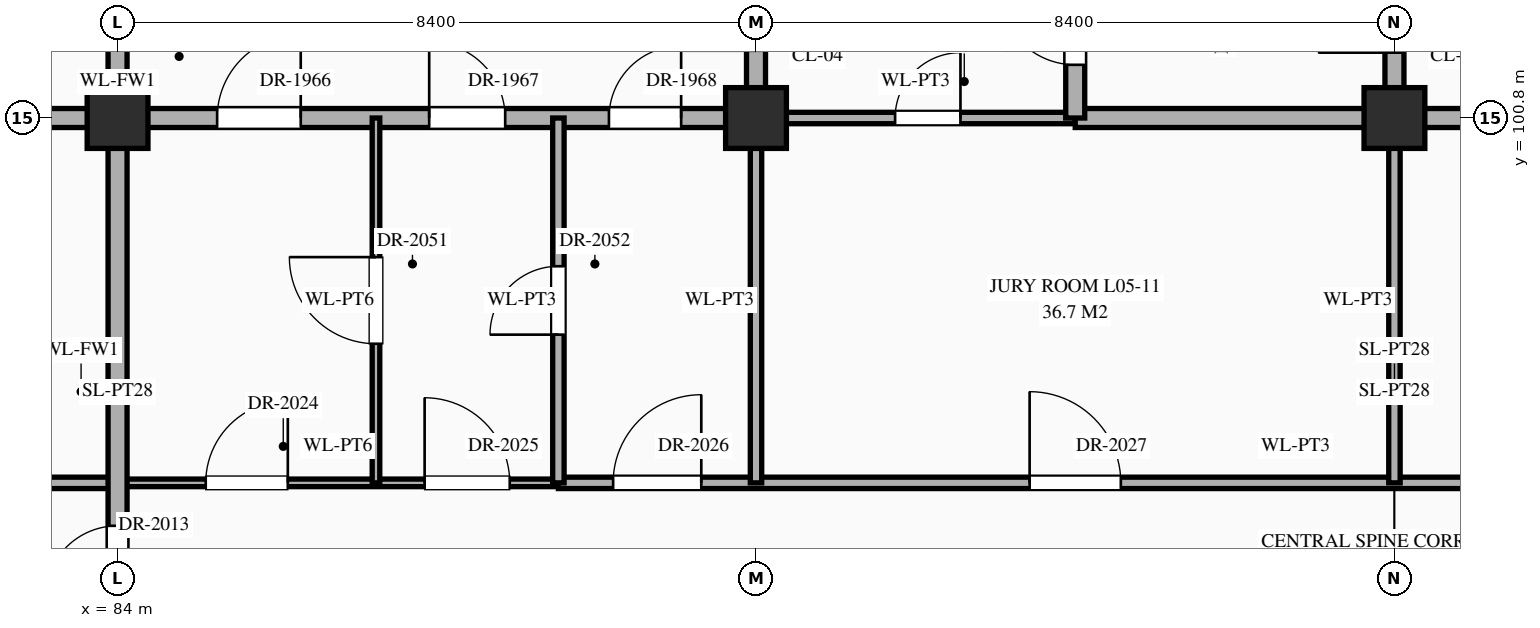
"""IFC4 building model, lengths in metres.
Left out: names, types, materials, properties, quantities, classifications, styles, units other than length and angle.
Written with IfcOpenShell. Run it as: python <this file> out.ifc"""

import sys

from ifc_helpers import new_model, si_unit, direction, frame, frame_2d, origin, origin_2d, place, context, subcontext, project, spatial, rectangle, extrude, element, fill, save


model = new_model("IFC4")
c1 = context("Model", 3, precision=1e-05, world=origin(), true_north=direction((0.0, 1.0)))
c2 = subcontext(c1, "Body", "Model", "MODEL_VIEW")
j1 = project(units=[si_unit("LENGTHUNIT", "METRE"), si_unit("PLANEANGLEUNIT", "RADIAN")], contexts=[c1])
p1 = place(None, origin())
s1 = spatial("IfcSite", under=j1, at=p1, CompositionType="ELEMENT")
p2 = place(p1, origin())
s2 = spatial("IfcBuilding", under=s1, at=p2, CompositionType="ELEMENT")
p3 = place(p2, frame((0.0, 0.0, 21.6)))
s3 = spatial("IfcBuildingStorey", under=s2, at=p3, CompositionType="ELEMENT", Elevation=21.6)
for number, where, z_axis, x_axis in (
    (1, (84.0, 100.8, 0.0), (0.0, 0.0, 1.0), (1.0, 0.0, 0.0)),
    (2, (92.4, 100.8, 0.0), (0.0, 0.0, 1.0), (1.0, 0.0, 0.0)),
    (3, (100.8, 100.8, 0.0), (0.0, 0.0, 1.0), (1.0, 0.0, 0.0)),
):
    element("IfcColumn", number, at=place(p3, frame(where, z_axis=z_axis, x_axis=x_axis)), inside=s3, PredefinedType="COLUMN", context=c2, shape_type="SweptSolid", body=[
        extrude(rectangle(XDim=0.8, YDim=0.8, at=origin_2d()), origin(), (0.0, 0.0, 1.0), 4.5),
    ])
p4 = place(p3, frame((56.2, 96.0, 0.0), z_axis=(0.0, 0.0, 1.0), x_axis=(1.0, 0.0, 0.0)))
e4 = element("IfcWall", 4, at=p4, inside=s3, PredefinedType="STANDARD", context=c2, shape_type="SweptSolid", body=[
    extrude(rectangle(XDim=27.8, YDim=0.15, at=frame_2d((13.9, 0.0))), origin(), (0.0, 0.0, 1.0), 4.24),
])
p5 = place(p4, frame((0.77, 0.0, 0.0)))
e5 = element("IfcOpeningElement", 5, at=p5, cuts=e4, PredefinedType="OPENING", context=c2, shape_type="SweptSolid", body=[
    extrude(rectangle(XDim=1.06, YDim=2.4, at=frame_2d((0.53, 1.2))), frame((0.0, 0.087, 0.0), z_axis=(0.0, -1.0, 0.0), x_axis=(1.0, 0.0, 0.0)), (0.0, 0.0, 1.0), 0.174),
])
p6 = place(p4, frame((6.23, 0.0, 0.0)))
e6 = element("IfcOpeningElement", 6, at=p6, cuts=e4, PredefinedType="OPENING", context=c2, shape_type="SweptSolid", body=[
    extrude(rectangle(XDim=1.14, YDim=2.4, at=frame_2d((0.57, 1.2))), frame((0.0, 0.087, 0.0), z_axis=(0.0, -1.0, 0.0), x_axis=(1.0, 0.0, 0.0)), (0.0, 0.0, 1.0), 0.174),
])
p7 = place(p4, frame((14.75, 0.0, 0.0)))
e7 = element("IfcOpeningElement", 7, at=p7, cuts=e4, PredefinedType="OPENING", context=c2, shape_type="SweptSolid", body=[
    extrude(rectangle(XDim=0.9, YDim=2.15, at=frame_2d((0.45, 1.075))), frame((0.0, 0.087, 0.0), z_axis=(0.0, -1.0, 0.0), x_axis=(1.0, 0.0, 0.0)), (0.0, 0.0, 1.0), 0.174),
])
p8 = place(p4, frame((23.17, 0.0, 0.0)))
e8 = element("IfcOpeningElement", 8, at=p8, cuts=e4, PredefinedType="OPENING", context=c2, shape_type="SweptSolid", body=[
    extrude(rectangle(XDim=0.86, YDim=2.1, at=frame_2d((0.43, 1.05))), frame((0.0, 0.087, 0.0), z_axis=(0.0, -1.0, 0.0), x_axis=(1.0, 0.0, 0.0)), (0.0, 0.0, 1.0), 0.174),
])
p9 = place(p3, frame((84.0, 96.0, 0.0), z_axis=(0.0, 0.0, 1.0), x_axis=(1.0, 0.0, 0.0)))
e9 = element("IfcWall", 9, at=p9, inside=s3, PredefinedType="STANDARD", context=c2, shape_type="SweptSolid", body=[
    extrude(rectangle(XDim=5.8, YDim=0.1, at=frame_2d((2.9, 0.0))), origin(), (0.0, 0.0, 1.0), 4.24),
])
p10 = place(p9, frame((1.16, 0.0, 0.0)))
e10 = element("IfcOpeningElement", 10, at=p10, cuts=e9, PredefinedType="OPENING", context=c2, shape_type="SweptSolid", body=[
    extrude(rectangle(XDim=1.08, YDim=2.25, at=frame_2d((0.54, 1.125))), frame((0.0, 0.062, 0.0), z_axis=(0.0, -1.0, 0.0), x_axis=(1.0, 0.0, 0.0)), (0.0, 0.0, 1.0), 0.124),
])
p11 = place(p9, frame((4.04, 0.0, 0.0)))
e11 = element("IfcOpeningElement", 11, at=p11, cuts=e9, PredefinedType="OPENING", context=c2, shape_type="SweptSolid", body=[
    extrude(rectangle(XDim=1.12, YDim=2.25, at=frame_2d((0.56, 1.125))), frame((0.0, 0.062, 0.0), z_axis=(0.0, -1.0, 0.0), x_axis=(1.0, 0.0, 0.0)), (0.0, 0.0, 1.0), 0.124),
])
p12 = place(p3, frame((89.8, 96.0, 0.0), z_axis=(0.0, 0.0, 1.0), x_axis=(1.0, 0.0, 0.0)))
e12 = element("IfcWall", 12, at=p12, inside=s3, PredefinedType="STANDARD", context=c2, shape_type="SweptSolid", body=[
    extrude(rectangle(XDim=19.4, YDim=0.15, at=frame_2d((9.7, 0.0))), origin(), (0.0, 0.0, 1.0), 4.24),
])
p13 = place(p12, frame((0.72, 0.0, 0.0)))
e13 = element("IfcOpeningElement", 13, at=p13, cuts=e12, PredefinedType="OPENING", context=c2, shape_type="SweptSolid", body=[
    extrude(rectangle(XDim=1.16, YDim=2.3, at=frame_2d((0.58, 1.15))), frame((0.0, 0.087, 0.0), z_axis=(0.0, -1.0, 0.0), x_axis=(1.0, 0.0, 0.0)), (0.0, 0.0, 1.0), 0.174),
])
p14 = place(p12, frame((6.2, 0.0, 0.0)))
e14 = element("IfcOpeningElement", 14, at=p14, cuts=e12, PredefinedType="OPENING", context=c2, shape_type="SweptSolid", body=[
    extrude(rectangle(XDim=1.2, YDim=2.35, at=frame_2d((0.6, 1.175))), frame((0.0, 0.087, 0.0), z_axis=(0.0, -1.0, 0.0), x_axis=(1.0, 0.0, 0.0)), (0.0, 0.0, 1.0), 0.174),
])
p15 = place(p12, frame((14.58, 0.0, 0.0)))
e15 = element("IfcOpeningElement", 15, at=p15, cuts=e12, PredefinedType="OPENING", context=c2, shape_type="SweptSolid", body=[
    extrude(rectangle(XDim=1.24, YDim=2.3, at=frame_2d((0.62, 1.15))), frame((0.0, 0.087, 0.0), z_axis=(0.0, -1.0, 0.0), x_axis=(1.0, 0.0, 0.0)), (0.0, 0.0, 1.0), 0.174),
])
p16 = place(p3, frame((75.6, 100.8, 0.0), z_axis=(0.0, 0.0, 1.0), x_axis=(1.0, 0.0, 0.0)))
e16 = element("IfcWall", 16, at=p16, inside=s3, PredefinedType="STANDARD", context=c2, shape_type="SweptSolid", body=[
    extrude(rectangle(XDim=16.8, YDim=0.25, at=frame_2d((8.4, 0.0))), origin(), (0.0, 0.0, 1.0), 3.39),
])
p17 = place(p16, frame((3.7, 0.0, 0.0)))
e17 = element("IfcOpeningElement", 17, at=p17, cuts=e16, PredefinedType="OPENING", context=c2, shape_type="SweptSolid", body=[
    extrude(rectangle(XDim=1.0, YDim=2.2, at=frame_2d((0.5, 1.1))), frame((0.0, 0.137, 0.0), z_axis=(0.0, -1.0, 0.0), x_axis=(1.0, 0.0, 0.0)), (0.0, 0.0, 1.0), 0.274),
])
p18 = place(p16, frame((9.71, 0.0, 0.0)))
e18 = element("IfcOpeningElement", 18, at=p18, cuts=e16, PredefinedType="OPENING", context=c2, shape_type="SweptSolid", body=[
    extrude(rectangle(XDim=1.1, YDim=2.2, at=frame_2d((0.55, 1.1))), frame((0.0, 0.137, 0.0), z_axis=(0.0, -1.0, 0.0), x_axis=(1.0, 0.0, 0.0)), (0.0, 0.0, 1.0), 0.274),
])
p19 = place(p16, frame((12.5, 0.0, 0.0)))
e19 = element("IfcOpeningElement", 19, at=p19, cuts=e16, PredefinedType="OPENING", context=c2, shape_type="SweptSolid", body=[
    extrude(rectangle(XDim=1.0, YDim=2.2, at=frame_2d((0.5, 1.1))), frame((0.0, 0.137, 0.0), z_axis=(0.0, -1.0, 0.0), x_axis=(1.0, 0.0, 0.0)), (0.0, 0.0, 1.0), 0.274),
])
p20 = place(p16, frame((14.865, 0.0, 0.0)))
e20 = element("IfcOpeningElement", 20, at=p20, cuts=e16, PredefinedType="OPENING", context=c2, shape_type="SweptSolid", body=[
    extrude(rectangle(XDim=0.95, YDim=2.15, at=frame_2d((0.475, 1.075))), frame((0.0, 0.137, 0.0), z_axis=(0.0, -1.0, 0.0), x_axis=(1.0, 0.0, 0.0)), (0.0, 0.0, 1.0), 0.274),
])
p21 = place(p3, frame((92.4, 100.8, 0.0), z_axis=(0.0, 0.0, 1.0), x_axis=(1.0, 0.0, 0.0)))
e21 = element("IfcWall", 21, at=p21, inside=s3, PredefinedType="STANDARD", context=c2, shape_type="SweptSolid", body=[
    extrude(rectangle(XDim=4.2, YDim=0.15, at=frame_2d((2.1, 0.0))), origin(), (0.0, 0.0, 1.0), 3.39),
])
p22 = place(p21, frame((1.83, 0.0, 0.0)))
e22 = element("IfcOpeningElement", 22, at=p22, cuts=e21, PredefinedType="OPENING", context=c2, shape_type="SweptSolid", body=[
    extrude(rectangle(XDim=0.86, YDim=2.1, at=frame_2d((0.43, 1.05))), frame((0.0, 0.087, 0.0), z_axis=(0.0, -1.0, 0.0), x_axis=(1.0, 0.0, 0.0)), (0.0, 0.0, 1.0), 0.174),
])
p23 = place(p3, frame((96.6, 100.8, 0.0), z_axis=(0.0, 0.0, 1.0), x_axis=(1.0, 0.0, 0.0)))
e23 = element("IfcWall", 23, at=p23, inside=s3, PredefinedType="STANDARD", context=c2, shape_type="SweptSolid", body=[
    extrude(rectangle(XDim=12.6, YDim=0.25, at=frame_2d((6.3, 0.0))), origin(), (0.0, 0.0, 1.0), 3.39),
])
p24 = place(p23, frame((7.85, 0.0, 0.0)))
e24 = element("IfcOpeningElement", 24, at=p24, cuts=e23, PredefinedType="OPENING", context=c2, shape_type="SweptSolid", body=[
    extrude(rectangle(XDim=1.1, YDim=2.2, at=frame_2d((0.55, 1.1))), frame((0.0, 0.137, 0.0), z_axis=(0.0, -1.0, 0.0), x_axis=(1.0, 0.0, 0.0)), (0.0, 0.0, 1.0), 0.274),
])
p25 = place(p3, frame((84.0, 79.24, 0.0), z_axis=(0.0, 0.0, 1.0), x_axis=(0.0, 1.0, 0.0)))
e25 = element("IfcWall", 25, at=p25, inside=s3, PredefinedType="STANDARD", context=c2, shape_type="SweptSolid", body=[
    extrude(rectangle(XDim=35.92, YDim=0.25, at=frame_2d((17.96, 0.0))), origin(), (0.0, 0.0, 1.0), 3.49),
])
p26 = place(p25, frame((22.72, 0.0, 0.0)))
e26 = element("IfcOpeningElement", 26, at=p26, cuts=e25, PredefinedType="OPENING", context=c2, shape_type="SweptSolid", body=[
    extrude(rectangle(XDim=1.6, YDim=2.3, at=frame_2d((0.8, 1.15))), frame((0.0, 0.137, 0.0), z_axis=(0.0, -1.0, 0.0), x_axis=(1.0, 0.0, 0.0)), (0.0, 0.0, 1.0), 0.274),
])
p27 = place(p25, frame((12.45, 0.0, 0.0)))
e27 = element("IfcOpeningElement", 27, at=p27, cuts=e25, PredefinedType="OPENING", context=c2, shape_type="SweptSolid", body=[
    extrude(rectangle(XDim=1.1, YDim=2.2, at=frame_2d((0.55, 1.1))), frame((0.0, 0.137, 0.0), z_axis=(0.0, -1.0, 0.0), x_axis=(1.0, 0.0, 0.0)), (0.0, 0.0, 1.0), 0.274),
])
p28 = place(p25, frame((15.245, 0.0, 0.0)))
e28 = element("IfcOpeningElement", 28, at=p28, cuts=e25, PredefinedType="OPENING", context=c2, shape_type="SweptSolid", body=[
    extrude(rectangle(XDim=0.95, YDim=2.15, at=frame_2d((0.475, 1.075))), frame((0.0, 0.137, 0.0), z_axis=(0.0, -1.0, 0.0), x_axis=(1.0, 0.0, 0.0)), (0.0, 0.0, 1.0), 0.274),
])
p29 = place(p25, frame((25.9, 0.0, 0.0)))
e29 = element("IfcOpeningElement", 29, at=p29, cuts=e25, PredefinedType="OPENING", context=c2, shape_type="SweptSolid", body=[
    extrude(rectangle(XDim=1.8, YDim=2.35, at=frame_2d((0.9, 1.175))), frame((0.0, 0.137, 0.0), z_axis=(0.0, -1.0, 0.0), x_axis=(1.0, 0.0, 0.0)), (0.0, 0.0, 1.0), 0.274),
])
p30 = place(p25, frame((29.62, 0.0, 0.0)))
e30 = element("IfcOpeningElement", 30, at=p30, cuts=e25, PredefinedType="OPENING", context=c2, shape_type="SweptSolid", body=[
    extrude(rectangle(XDim=1.0, YDim=2.2, at=frame_2d((0.5, 1.1))), frame((0.0, 0.137, 0.0), z_axis=(0.0, -1.0, 0.0), x_axis=(1.0, 0.0, 0.0)), (0.0, 0.0, 1.0), 0.274),
])
p31 = place(p25, frame((5.3, 0.0, 0.0)))
e31 = element("IfcOpeningElement", 31, at=p31, cuts=e25, PredefinedType="OPENING", context=c2, shape_type="SweptSolid", body=[
    extrude(rectangle(XDim=1.0, YDim=2.2, at=frame_2d((0.5, 1.1))), frame((0.0, 0.137, 0.0), z_axis=(0.0, -1.0, 0.0), x_axis=(1.0, 0.0, 0.0)), (0.0, 0.0, 1.0), 0.274),
])
p32 = place(p3, frame((87.4, 96.0, 0.0), z_axis=(0.0, 0.0, 1.0), x_axis=(0.0, 1.0, 0.0)))
e32 = element("IfcWall", 32, at=p32, inside=s3, PredefinedType="STANDARD", context=c2, shape_type="SweptSolid", body=[
    extrude(rectangle(XDim=4.8, YDim=0.1, at=frame_2d((2.4, 0.0))), origin(), (0.0, 0.0, 1.0), 4.24),
])
p33 = place(p32, frame((1.83, 0.0, 0.0)))
e33 = element("IfcOpeningElement", 33, at=p33, cuts=e32, PredefinedType="OPENING", context=c2, shape_type="SweptSolid", body=[
    extrude(rectangle(XDim=1.14, YDim=2.4, at=frame_2d((0.57, 1.2))), frame((0.0, 0.062, 0.0), z_axis=(0.0, -1.0, 0.0), x_axis=(1.0, 0.0, 0.0)), (0.0, 0.0, 1.0), 0.124),
])
p34 = place(p3, frame((89.8, 96.0, 0.0), z_axis=(0.0, 0.0, 1.0), x_axis=(0.0, 1.0, 0.0)))
e34 = element("IfcWall", 34, at=p34, inside=s3, PredefinedType="STANDARD", context=c2, shape_type="SweptSolid", body=[
    extrude(rectangle(XDim=4.8, YDim=0.15, at=frame_2d((2.4, 0.0))), origin(), (0.0, 0.0, 1.0), 4.24),
])
p35 = place(p34, frame((1.95, 0.0, 0.0)))
e35 = element("IfcOpeningElement", 35, at=p35, cuts=e34, PredefinedType="OPENING", context=c2, shape_type="SweptSolid", body=[
    extrude(rectangle(XDim=0.9, YDim=2.15, at=frame_2d((0.45, 1.075))), frame((0.0, 0.087, 0.0), z_axis=(0.0, -1.0, 0.0), x_axis=(1.0, 0.0, 0.0)), (0.0, 0.0, 1.0), 0.174),
])
p36 = place(p3, frame((92.4, 96.0, 0.0), z_axis=(0.0, 0.0, 1.0), x_axis=(0.0, 1.0, 0.0)))
e36 = element("IfcWall", 36, at=p36, inside=s3, PredefinedType="STANDARD", context=c2, shape_type="SweptSolid", body=[
    extrude(rectangle(XDim=4.8, YDim=0.15, at=frame_2d((2.4, 0.0))), origin(), (0.0, 0.0, 1.0), 3.49),
])
p37 = place(p3, frame((92.4, 100.8, 0.0), z_axis=(0.0, 0.0, 1.0), x_axis=(0.0, 1.0, 0.0)))
e37 = element("IfcWall", 37, at=p37, inside=s3, PredefinedType="STANDARD", context=c2, shape_type="SweptSolid", body=[
    extrude(rectangle(XDim=3.6, YDim=0.25, at=frame_2d((1.8, 0.0))), origin(), (0.0, 0.0, 1.0), 3.49),
])
p38 = place(p37, frame((0.885, 0.0, 0.0)))
e38 = element("IfcOpeningElement", 38, at=p38, cuts=e37, PredefinedType="OPENING", context=c2, shape_type="SweptSolid", body=[
    extrude(rectangle(XDim=0.95, YDim=2.15, at=frame_2d((0.475, 1.075))), frame((0.0, 0.137, 0.0), z_axis=(0.0, -1.0, 0.0), x_axis=(1.0, 0.0, 0.0)), (0.0, 0.0, 1.0), 0.274),
])
p39 = place(p3, frame((96.6, 100.8, 0.0), z_axis=(0.0, 0.0, 1.0), x_axis=(0.0, 1.0, 0.0)))
e39 = element("IfcWall", 39, at=p39, inside=s3, PredefinedType="STANDARD", context=c2, shape_type="SweptSolid", body=[
    extrude(rectangle(XDim=3.6, YDim=0.25, at=frame_2d((1.8, 0.0))), origin(), (0.0, 0.0, 1.0), 3.89),
])
p40 = place(p39, frame((0.7, 0.0, 0.0)))
e40 = element("IfcOpeningElement", 40, at=p40, cuts=e39, PredefinedType="OPENING", context=c2, shape_type="SweptSolid", body=[
    extrude(rectangle(XDim=1.0, YDim=2.2, at=frame_2d((0.5, 1.1))), frame((0.0, 0.137, 0.0), z_axis=(0.0, -1.0, 0.0), x_axis=(1.0, 0.0, 0.0)), (0.0, 0.0, 1.0), 0.274),
])
p41 = place(p3, frame((100.8, 96.0, 0.0), z_axis=(0.0, 0.0, 1.0), x_axis=(0.0, 1.0, 0.0)))
e41 = element("IfcWall", 41, at=p41, inside=s3, PredefinedType="STANDARD", context=c2, shape_type="SweptSolid", body=[
    extrude(rectangle(XDim=4.8, YDim=0.15, at=frame_2d((2.4, 0.0))), origin(), (0.0, 0.0, 1.0), 3.49),
])
p42 = place(p3, frame((100.8, 100.8, 0.0), z_axis=(0.0, 0.0, 1.0), x_axis=(0.0, 1.0, 0.0)))
e42 = element("IfcWall", 42, at=p42, inside=s3, PredefinedType="STANDARD", context=c2, shape_type="SweptSolid", body=[
    extrude(rectangle(XDim=2.4, YDim=0.25, at=frame_2d((1.2, 0.0))), origin(), (0.0, 0.0, 1.0), 3.49),
])
p43 = place(p42, frame((0.86, 0.0, 0.0)))
e43 = element("IfcOpeningElement", 43, at=p43, cuts=e42, PredefinedType="OPENING", context=c2, shape_type="SweptSolid", body=[
    extrude(rectangle(XDim=1.0, YDim=2.2, at=frame_2d((0.5, 1.1))), frame((0.0, 0.137, 0.0), z_axis=(0.0, -1.0, 0.0), x_axis=(1.0, 0.0, 0.0)), (0.0, 0.0, 1.0), 0.274),
])
p44 = place(p40, origin())
e44 = element("IfcDoor", 44, at=p44, inside=s3, OperationType="SINGLE_SWING_RIGHT", PredefinedType="DOOR", context=c2, shape_type="SweptSolid", body=[
    extrude(rectangle(XDim=1.0, YDim=2.2, at=frame_2d((0.5, 1.1))), frame((0.0, 0.025, 0.0), z_axis=(0.0, -1.0, 0.0), x_axis=(1.0, 0.0, 0.0)), (0.0, 0.0, 1.0), 0.05),
])
fill(e40, e44)
p45 = place(p22, origin())
e45 = element("IfcDoor", 45, at=p45, inside=s3, OperationType="SINGLE_SWING_RIGHT", PredefinedType="DOOR", context=c2, shape_type="SweptSolid", body=[
    extrude(rectangle(XDim=0.86, YDim=2.1, at=frame_2d((0.43, 1.05))), frame((0.0, 0.025, 0.0), z_axis=(0.0, -1.0, 0.0), x_axis=(1.0, 0.0, 0.0)), (0.0, 0.0, 1.0), 0.05),
])
fill(e22, e45)
p46 = place(p18, origin())
e46 = element("IfcDoor", 46, at=p46, inside=s3, OperationType="SINGLE_SWING_RIGHT", PredefinedType="DOOR", context=c2, shape_type="SweptSolid", body=[
    extrude(rectangle(XDim=1.1, YDim=2.2, at=frame_2d((0.55, 1.1))), frame((0.0, 0.025, 0.0), z_axis=(0.0, -1.0, 0.0), x_axis=(1.0, 0.0, 0.0)), (0.0, 0.0, 1.0), 0.05),
])
fill(e18, e46)
p47 = place(p19, origin())
e47 = element("IfcDoor", 47, at=p47, inside=s3, OperationType="SINGLE_SWING_LEFT", PredefinedType="DOOR", context=c2, shape_type="SweptSolid", body=[
    extrude(rectangle(XDim=1.0, YDim=2.2, at=frame_2d((0.5, 1.1))), frame((0.0, 0.025, 0.0), z_axis=(0.0, -1.0, 0.0), x_axis=(1.0, 0.0, 0.0)), (0.0, 0.0, 1.0), 0.05),
])
fill(e19, e47)
p48 = place(p20, origin())
e48 = element("IfcDoor", 48, at=p48, inside=s3, OperationType="SINGLE_SWING_RIGHT", PredefinedType="DOOR", context=c2, shape_type="SweptSolid", body=[
    extrude(rectangle(XDim=0.95, YDim=2.15, at=frame_2d((0.475, 1.075))), frame((0.0, 0.025, 0.0), z_axis=(0.0, -1.0, 0.0), x_axis=(1.0, 0.0, 0.0)), (0.0, 0.0, 1.0), 0.05),
])
fill(e20, e48)
p49 = place(p28, origin())
e49 = element("IfcDoor", 49, at=p49, inside=s3, OperationType="SINGLE_SWING_LEFT", PredefinedType="DOOR", context=c2, shape_type="SweptSolid", body=[
    extrude(rectangle(XDim=0.95, YDim=2.15, at=frame_2d((0.475, 1.075))), frame((0.0, 0.025, 0.0), z_axis=(0.0, -1.0, 0.0), x_axis=(1.0, 0.0, 0.0)), (0.0, 0.0, 1.0), 0.05),
])
fill(e28, e49)
p50 = place(p10, origin())
e50 = element("IfcDoor", 50, at=p50, inside=s3, OperationType="SINGLE_SWING_RIGHT", PredefinedType="DOOR", context=c2, shape_type="SweptSolid", body=[
    extrude(rectangle(XDim=1.08, YDim=2.25, at=frame_2d((0.54, 1.125))), frame((0.0, 0.025, 0.0), z_axis=(0.0, -1.0, 0.0), x_axis=(1.0, 0.0, 0.0)), (0.0, 0.0, 1.0), 0.05),
])
fill(e10, e50)
p51 = place(p11, origin())
e51 = element("IfcDoor", 51, at=p51, inside=s3, OperationType="SINGLE_SWING_LEFT", PredefinedType="DOOR", context=c2, shape_type="SweptSolid", body=[
    extrude(rectangle(XDim=1.12, YDim=2.25, at=frame_2d((0.56, 1.125))), frame((0.0, 0.025, 0.0), z_axis=(0.0, -1.0, 0.0), x_axis=(1.0, 0.0, 0.0)), (0.0, 0.0, 1.0), 0.05),
])
fill(e11, e51)
p52 = place(p13, origin())
e52 = element("IfcDoor", 52, at=p52, inside=s3, OperationType="SINGLE_SWING_RIGHT", PredefinedType="DOOR", context=c2, shape_type="SweptSolid", body=[
    extrude(rectangle(XDim=1.16, YDim=2.3, at=frame_2d((0.58, 1.15))), frame((0.0, 0.025, 0.0), z_axis=(0.0, -1.0, 0.0), x_axis=(1.0, 0.0, 0.0)), (0.0, 0.0, 1.0), 0.05),
])
fill(e13, e52)
p53 = place(p14, origin())
e53 = element("IfcDoor", 53, at=p53, inside=s3, OperationType="SINGLE_SWING_LEFT", PredefinedType="DOOR", context=c2, shape_type="SweptSolid", body=[
    extrude(rectangle(XDim=1.2, YDim=2.35, at=frame_2d((0.6, 1.175))), frame((0.0, 0.025, 0.0), z_axis=(0.0, -1.0, 0.0), x_axis=(1.0, 0.0, 0.0)), (0.0, 0.0, 1.0), 0.05),
])
fill(e14, e53)
p54 = place(p33, origin())
e54 = element("IfcDoor", 54, at=p54, inside=s3, OperationType="SINGLE_SWING_RIGHT", PredefinedType="DOOR", context=c2, shape_type="SweptSolid", body=[
    extrude(rectangle(XDim=1.14, YDim=2.4, at=frame_2d((0.57, 1.2))), frame((0.0, 0.025, 0.0), z_axis=(0.0, -1.0, 0.0), x_axis=(1.0, 0.0, 0.0)), (0.0, 0.0, 1.0), 0.05),
])
fill(e33, e54)
p55 = place(p35, origin())
e55 = element("IfcDoor", 55, at=p55, inside=s3, OperationType="SINGLE_SWING_LEFT", PredefinedType="DOOR", context=c2, shape_type="SweptSolid", body=[
    extrude(rectangle(XDim=0.9, YDim=2.15, at=frame_2d((0.45, 1.075))), frame((0.0, 0.025, 0.0), z_axis=(0.0, -1.0, 0.0), x_axis=(1.0, 0.0, 0.0)), (0.0, 0.0, 1.0), 0.05),
])
fill(e35, e55)
save(model, sys.argv[1])
